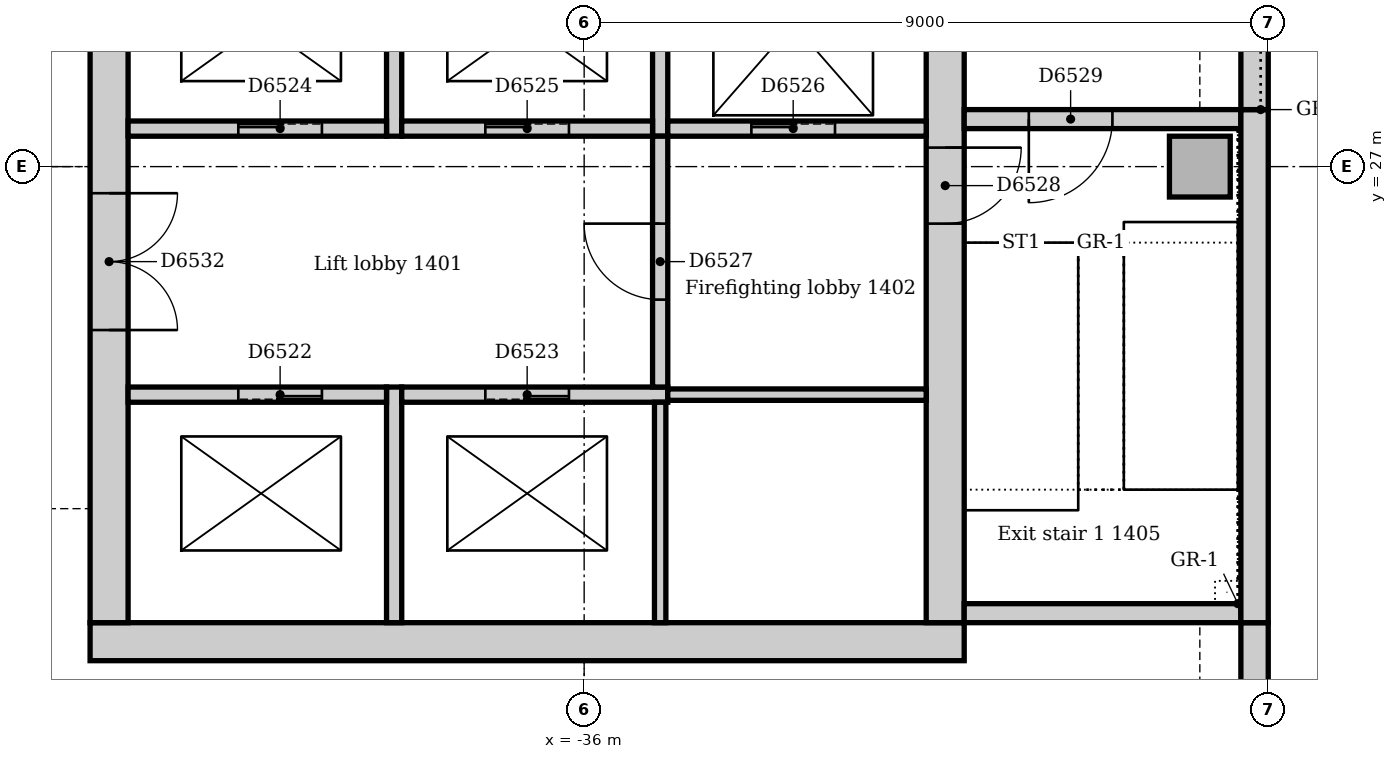
"""IFC4 building model, lengths in metres.
Left out: names, types, materials, properties, quantities, classifications, styles, units other than length and angle.
Written with IfcOpenShell. Run it as: python <this file> out.ifc"""

import sys

from ifc_helpers import new_model, si_unit, direction, frame, frame_2d, origin, origin_2d, place, context, subcontext, project, spatial, rectangle, extrude, element, fill, save


model = new_model("IFC4")
c1 = context("Model", 3, precision=1e-05, world=origin(), true_north=direction((0.0, 1.0)))
c2 = subcontext(c1, "Body", "Model", "MODEL_VIEW")
j1 = project(units=[si_unit("LENGTHUNIT", "METRE"), si_unit("PLANEANGLEUNIT", "RADIAN")], contexts=[c1])
p1 = place(None, origin())
s1 = spatial("IfcSite", under=j1, at=p1, CompositionType="ELEMENT")
p2 = place(p1, origin())
s2 = spatial("IfcBuilding", under=s1, at=p2, CompositionType="ELEMENT")
p3 = place(p2, frame((0.0, 0.0, 63.0)))
s3 = spatial("IfcBuildingStorey", under=s2, at=p3, CompositionType="ELEMENT", Elevation=63.0)
p4 = place(p3, frame((-42.5, 20.75, 0.0), z_axis=(0.0, 0.0, 1.0), x_axis=(1.0, 0.0, 0.0)))
e1 = element("IfcWall", 1, at=p4, inside=s3, PredefinedType="SOLIDWALL", context=c2, shape_type="SweptSolid", body=[
    extrude(rectangle(XDim=11.5, YDim=0.5, at=frame_2d((5.75, 0.0))), origin(), (0.0, 0.0, 1.0), 4.0),
])
p5 = place(p3, frame((-31.25, 21.0, 0.0), z_axis=(0.0, 0.0, 1.0), x_axis=(0.0, 1.0, 0.0)))
e2 = element("IfcWall", 2, at=p5, inside=s3, PredefinedType="SOLIDWALL", context=c2, shape_type="SweptSolid", body=[
    extrude(rectangle(XDim=9.5, YDim=0.5, at=frame_2d((4.75, 0.0))), origin(), (0.0, 0.0, 1.0), 4.0),
])
p6 = place(p5, frame((5.25, 0.0, 0.0)))
e3 = element("IfcOpeningElement", 3, at=p6, cuts=e2, PredefinedType="OPENING", context=c2, shape_type="SweptSolid", body=[
    extrude(rectangle(XDim=1.0, YDim=2.1, at=frame_2d((0.5, 1.05))), frame((0.0, 0.26, 0.0), z_axis=(0.0, -1.0, 0.0), x_axis=(1.0, 0.0, 0.0)), (0.0, 0.0, 1.0), 0.52),
])
p7 = place(p3, frame((-42.25, 30.5, 0.0), z_axis=(0.0, 0.0, 1.0), x_axis=(0.0, -1.0, 0.0)))
e4 = element("IfcWall", 4, at=p7, inside=s3, PredefinedType="SOLIDWALL", context=c2, shape_type="SweptSolid", body=[
    extrude(rectangle(XDim=9.5, YDim=0.5, at=frame_2d((4.75, 0.0))), origin(), (0.0, 0.0, 1.0), 4.0),
])
p8 = place(p7, frame((3.85, 0.0, 0.0)))
e5 = element("IfcOpeningElement", 5, at=p8, cuts=e4, PredefinedType="OPENING", context=c2, shape_type="SweptSolid", body=[
    extrude(rectangle(XDim=1.8, YDim=2.1, at=frame_2d((0.9, 1.05))), frame((0.0, 0.26, 0.0), z_axis=(0.0, -1.0, 0.0), x_axis=(1.0, 0.0, 0.0)), (0.0, 0.0, 1.0), 0.52),
])
p9 = place(p3, frame((-31.0, 21.125, 0.0), z_axis=(0.0, 0.0, 1.0), x_axis=(1.0, 0.0, 0.0)))
e6 = element("IfcWall", 6, at=p9, inside=s3, PredefinedType="SOLIDWALL", context=c2, shape_type="SweptSolid", body=[
    extrude(rectangle(XDim=3.64, YDim=0.25, at=frame_2d((1.82, 0.0))), origin(), (0.0, 0.0, 1.0), 4.0),
])
p10 = place(p3, frame((-27.36, 27.625, 0.0), z_axis=(0.0, 0.0, 1.0), x_axis=(-1.0, 0.0, 0.0)))
e7 = element("IfcWall", 7, at=p10, inside=s3, PredefinedType="SOLIDWALL", context=c2, shape_type="SweptSolid", body=[
    extrude(rectangle(XDim=3.64, YDim=0.25, at=frame_2d((1.82, 0.0))), origin(), (0.0, 0.0, 1.0), 4.0),
])
p11 = place(p10, frame((1.69, 0.0, 0.0)))
e8 = element("IfcOpeningElement", 8, at=p11, cuts=e7, PredefinedType="OPENING", context=c2, shape_type="SweptSolid", body=[
    extrude(rectangle(XDim=1.1, YDim=2.1, at=frame_2d((0.55, 1.05))), frame((0.0, 0.135, 0.0), z_axis=(0.0, -1.0, 0.0), x_axis=(1.0, 0.0, 0.0)), (0.0, 0.0, 1.0), 0.27),
])
p12 = place(p3, frame((-27.9, 27.0, 0.0), z_axis=(0.0, 0.0, 1.0), x_axis=(1.0, 0.0, 0.0)))
e9 = element("IfcColumn", 9, at=p12, inside=s3, PredefinedType="COLUMN", context=c2, shape_type="SweptSolid", body=[
    extrude(rectangle(XDim=0.8, YDim=0.8, at=origin_2d()), origin(), (0.0, 0.0, 1.0), 4.0),
])
p13 = place(p3, frame((-27.18, 13.243, 0.0), z_axis=(0.0, 0.0, 1.0), x_axis=(0.0, 1.0, 0.0)))
e10 = element("IfcWall", 10, at=p13, inside=s3, PredefinedType="STANDARD", context=c2, shape_type="SweptSolid", body=[
    extrude(rectangle(XDim=7.757, YDim=0.36, at=frame_2d((3.879, 0.0))), origin(), (0.0, 0.0, 1.0), 3.85),
])
p14 = place(p13, frame((1.982, 0.0, 0.9)))
e11 = element("IfcOpeningElement", 11, at=p14, cuts=e10, PredefinedType="OPENING", context=c2, shape_type="SweptSolid", body=[
    extrude(rectangle(XDim=3.3, YDim=1.6, at=frame_2d((1.65, 0.8))), frame((0.0, 0.19, 0.0), z_axis=(0.0, -1.0, 0.0), x_axis=(1.0, 0.0, 0.0)), (0.0, 0.0, 1.0), 0.38),
])
p15 = place(p3, frame((-27.18, 21.0, 0.0), z_axis=(0.0, 0.0, 1.0), x_axis=(0.0, 1.0, 0.0)))
e12 = element("IfcWall", 12, at=p15, inside=s3, PredefinedType="STANDARD", context=c2, shape_type="SweptSolid", body=[
    extrude(rectangle(XDim=6.75, YDim=0.36, at=frame_2d((3.375, 0.0))), origin(), (0.0, 0.0, 1.0), 3.85),
])
p16 = place(p3, frame((-27.18, 27.75, 0.0), z_axis=(0.0, 0.0, 1.0), x_axis=(0.0, 1.0, 0.0)))
e13 = element("IfcWall", 13, at=p16, inside=s3, PredefinedType="STANDARD", context=c2, shape_type="SweptSolid", body=[
    extrude(rectangle(XDim=7.5, YDim=0.36, at=frame_2d((3.75, 0.0))), origin(), (0.0, 0.0, 1.0), 3.85),
])
p17 = place(p16, frame((2.85, 0.0, 1.2)))
e14 = element("IfcOpeningElement", 14, at=p17, cuts=e13, PredefinedType="OPENING", context=c2, shape_type="SweptSolid", body=[
    extrude(rectangle(XDim=1.8, YDim=1.2, at=frame_2d((0.9, 0.6))), frame((0.0, 0.19, 0.0), z_axis=(0.0, -1.0, 0.0), x_axis=(1.0, 0.0, 0.0)), (0.0, 0.0, 1.0), 0.38),
])
p18 = place(p3, frame((-38.5, 21.0, 0.0), z_axis=(0.0, 0.0, 1.0), x_axis=(0.0, 1.0, 0.0)))
e15 = element("IfcWall", 15, at=p18, inside=s3, PredefinedType="SOLIDWALL", context=c2, shape_type="SweptSolid", body=[
    extrude(rectangle(XDim=3.1, YDim=0.2, at=frame_2d((1.55, 0.0))), origin(), (0.0, 0.0, 1.0), 4.0),
])
p19 = place(p3, frame((-38.6, 24.0, 0.0), z_axis=(0.0, 0.0, 1.0), x_axis=(-1.0, 0.0, 0.0)))
e16 = element("IfcWall", 16, at=p19, inside=s3, PredefinedType="SOLIDWALL", context=c2, shape_type="SweptSolid", body=[
    extrude(rectangle(XDim=3.4, YDim=0.2, at=frame_2d((1.7, 0.0))), origin(), (0.0, 0.0, 1.0), 4.0),
])
p20 = place(p19, frame((0.85, 0.0, 0.0)))
e17 = element("IfcOpeningElement", 17, at=p20, cuts=e16, PredefinedType="OPENING", context=c2, shape_type="SweptSolid", body=[
    extrude(rectangle(XDim=1.1, YDim=2.1, at=frame_2d((0.55, 1.05))), frame((0.0, 0.11, 0.0), z_axis=(0.0, -1.0, 0.0), x_axis=(1.0, 0.0, 0.0)), (0.0, 0.0, 1.0), 0.22),
])
p21 = place(p3, frame((-34.9, 24.0, 0.0), z_axis=(0.0, 0.0, 1.0), x_axis=(-1.0, 0.0, 0.0)))
e18 = element("IfcWall", 18, at=p21, inside=s3, PredefinedType="SOLIDWALL", context=c2, shape_type="SweptSolid", body=[
    extrude(rectangle(XDim=3.5, YDim=0.2, at=frame_2d((1.75, 0.0))), origin(), (0.0, 0.0, 1.0), 4.0),
])
p22 = place(p21, frame((1.3, 0.0, 0.0)))
e19 = element("IfcOpeningElement", 19, at=p22, cuts=e18, PredefinedType="OPENING", context=c2, shape_type="SweptSolid", body=[
    extrude(rectangle(XDim=1.1, YDim=2.1, at=frame_2d((0.55, 1.05))), frame((0.0, 0.11, 0.0), z_axis=(0.0, -1.0, 0.0), x_axis=(1.0, 0.0, 0.0)), (0.0, 0.0, 1.0), 0.22),
])
p23 = place(p3, frame((-38.5, 27.4, 0.0), z_axis=(0.0, 0.0, 1.0), x_axis=(0.0, 1.0, 0.0)))
e20 = element("IfcWall", 20, at=p23, inside=s3, PredefinedType="SOLIDWALL", context=c2, shape_type="SweptSolid", body=[
    extrude(rectangle(XDim=2.85, YDim=0.2, at=frame_2d((1.425, 0.0))), origin(), (0.0, 0.0, 1.0), 4.0),
])
p24 = place(p3, frame((-42.0, 27.5, 0.0), z_axis=(0.0, 0.0, 1.0), x_axis=(1.0, 0.0, 0.0)))
e21 = element("IfcWall", 21, at=p24, inside=s3, PredefinedType="SOLIDWALL", context=c2, shape_type="SweptSolid", body=[
    extrude(rectangle(XDim=3.4, YDim=0.2, at=frame_2d((1.7, 0.0))), origin(), (0.0, 0.0, 1.0), 4.0),
])
p25 = place(p24, frame((1.45, 0.0, 0.0)))
e22 = element("IfcOpeningElement", 22, at=p25, cuts=e21, PredefinedType="OPENING", context=c2, shape_type="SweptSolid", body=[
    extrude(rectangle(XDim=1.1, YDim=2.1, at=frame_2d((0.55, 1.05))), frame((0.0, 0.11, 0.0), z_axis=(0.0, -1.0, 0.0), x_axis=(1.0, 0.0, 0.0)), (0.0, 0.0, 1.0), 0.22),
])
p26 = place(p3, frame((-35.0, 27.4, 0.0), z_axis=(0.0, 0.0, 1.0), x_axis=(0.0, 1.0, 0.0)))
e23 = element("IfcWall", 23, at=p26, inside=s3, PredefinedType="SOLIDWALL", context=c2, shape_type="SweptSolid", body=[
    extrude(rectangle(XDim=2.85, YDim=0.2, at=frame_2d((1.425, 0.0))), origin(), (0.0, 0.0, 1.0), 4.0),
])
p27 = place(p3, frame((-38.4, 27.5, 0.0), z_axis=(0.0, 0.0, 1.0), x_axis=(1.0, 0.0, 0.0)))
e24 = element("IfcWall", 24, at=p27, inside=s3, PredefinedType="SOLIDWALL", context=c2, shape_type="SweptSolid", body=[
    extrude(rectangle(XDim=3.3, YDim=0.2, at=frame_2d((1.65, 0.0))), origin(), (0.0, 0.0, 1.0), 4.0),
])
p28 = place(p27, frame((1.1, 0.0, 0.0)))
e25 = element("IfcOpeningElement", 25, at=p28, cuts=e24, PredefinedType="OPENING", context=c2, shape_type="SweptSolid", body=[
    extrude(rectangle(XDim=1.1, YDim=2.1, at=frame_2d((0.55, 1.05))), frame((0.0, 0.11, 0.0), z_axis=(0.0, -1.0, 0.0), x_axis=(1.0, 0.0, 0.0)), (0.0, 0.0, 1.0), 0.22),
])
p29 = place(p3, frame((-34.9, 27.5, 0.0), z_axis=(0.0, 0.0, 1.0), x_axis=(1.0, 0.0, 0.0)))
e26 = element("IfcWall", 26, at=p29, inside=s3, PredefinedType="SOLIDWALL", context=c2, shape_type="SweptSolid", body=[
    extrude(rectangle(XDim=3.4, YDim=0.2, at=frame_2d((1.7, 0.0))), origin(), (0.0, 0.0, 1.0), 4.0),
])
p30 = place(p29, frame((1.1, 0.0, 0.0)))
e27 = element("IfcOpeningElement", 27, at=p30, cuts=e26, PredefinedType="OPENING", context=c2, shape_type="SweptSolid", body=[
    extrude(rectangle(XDim=1.1, YDim=2.1, at=frame_2d((0.55, 1.05))), frame((0.0, 0.11, 0.0), z_axis=(0.0, -1.0, 0.0), x_axis=(1.0, 0.0, 0.0)), (0.0, 0.0, 1.0), 0.22),
])
p31 = place(p3, frame((-35.0, 24.1, 0.0), z_axis=(0.0, 0.0, 1.0), x_axis=(0.0, 1.0, 0.0)))
e28 = element("IfcWall", 28, at=p31, inside=s3, PredefinedType="SOLIDWALL", context=c2, shape_type="SweptSolid", body=[
    extrude(rectangle(XDim=3.3, YDim=0.2, at=frame_2d((1.65, 0.0))), origin(), (0.0, 0.0, 1.0), 4.0),
])
p32 = place(p31, frame((1.15, 0.0, 0.0)))
e29 = element("IfcOpeningElement", 29, at=p32, cuts=e28, PredefinedType="OPENING", context=c2, shape_type="SweptSolid", body=[
    extrude(rectangle(XDim=1.0, YDim=2.1, at=frame_2d((0.5, 1.05))), frame((0.0, 0.11, 0.0), z_axis=(0.0, -1.0, 0.0), x_axis=(1.0, 0.0, 0.0)), (0.0, 0.0, 1.0), 0.22),
])
p33 = place(p3, frame((-35.0, 21.0, 0.0), z_axis=(0.0, 0.0, 1.0), x_axis=(0.0, 1.0, 0.0)))
e30 = element("IfcWall", 30, at=p33, inside=s3, PredefinedType="SOLIDWALL", context=c2, shape_type="SweptSolid", body=[
    extrude(rectangle(XDim=2.9, YDim=0.15, at=frame_2d((1.45, 0.0))), origin(), (0.0, 0.0, 1.0), 4.0),
])
p34 = place(p3, frame((-31.5, 24.0, 0.0), z_axis=(0.0, 0.0, 1.0), x_axis=(-1.0, 0.0, 0.0)))
e31 = element("IfcWall", 31, at=p34, inside=s3, PredefinedType="SOLIDWALL", context=c2, shape_type="SweptSolid", body=[
    extrude(rectangle(XDim=3.4, YDim=0.15, at=frame_2d((1.7, 0.0))), origin(), (0.0, 0.0, 1.0), 4.0),
])
p35 = place(p20, origin())
e32 = element("IfcDoor", 32, at=p35, inside=s3, OperationType="SLIDING_TO_LEFT", PredefinedType="DOOR", context=c2, shape_type="SweptSolid", body=[
    extrude(rectangle(XDim=1.1, YDim=2.1, at=frame_2d((0.55, 1.05))), frame((0.0, 0.025, 0.0), z_axis=(0.0, -1.0, 0.0), x_axis=(1.0, 0.0, 0.0)), (0.0, 0.0, 1.0), 0.05),
])
fill(e17, e32)
p36 = place(p22, origin())
e33 = element("IfcDoor", 33, at=p36, inside=s3, OperationType="SLIDING_TO_LEFT", PredefinedType="DOOR", context=c2, shape_type="SweptSolid", body=[
    extrude(rectangle(XDim=1.1, YDim=2.1, at=frame_2d((0.55, 1.05))), frame((0.0, 0.025, 0.0), z_axis=(0.0, -1.0, 0.0), x_axis=(1.0, 0.0, 0.0)), (0.0, 0.0, 1.0), 0.05),
])
fill(e19, e33)
p37 = place(p25, origin())
e34 = element("IfcDoor", 34, at=p37, inside=s3, OperationType="SLIDING_TO_LEFT", PredefinedType="DOOR", context=c2, shape_type="SweptSolid", body=[
    extrude(rectangle(XDim=1.1, YDim=2.1, at=frame_2d((0.55, 1.05))), frame((0.0, 0.025, 0.0), z_axis=(0.0, -1.0, 0.0), x_axis=(1.0, 0.0, 0.0)), (0.0, 0.0, 1.0), 0.05),
])
fill(e22, e34)
p38 = place(p28, origin())
e35 = element("IfcDoor", 35, at=p38, inside=s3, OperationType="SLIDING_TO_LEFT", PredefinedType="DOOR", context=c2, shape_type="SweptSolid", body=[
    extrude(rectangle(XDim=1.1, YDim=2.1, at=frame_2d((0.55, 1.05))), frame((0.0, 0.025, 0.0), z_axis=(0.0, -1.0, 0.0), x_axis=(1.0, 0.0, 0.0)), (0.0, 0.0, 1.0), 0.05),
])
fill(e25, e35)
p39 = place(p30, origin())
e36 = element("IfcDoor", 36, at=p39, inside=s3, OperationType="SLIDING_TO_LEFT", PredefinedType="DOOR", context=c2, shape_type="SweptSolid", body=[
    extrude(rectangle(XDim=1.1, YDim=2.1, at=frame_2d((0.55, 1.05))), frame((0.0, 0.025, 0.0), z_axis=(0.0, -1.0, 0.0), x_axis=(1.0, 0.0, 0.0)), (0.0, 0.0, 1.0), 0.05),
])
fill(e27, e36)
p40 = place(p32, origin())
e37 = element("IfcDoor", 37, at=p40, inside=s3, OperationType="SINGLE_SWING_RIGHT", PredefinedType="DOOR", context=c2, shape_type="SweptSolid", body=[
    extrude(rectangle(XDim=1.0, YDim=2.1, at=frame_2d((0.5, 1.05))), frame((0.0, 0.025, 0.0), z_axis=(0.0, -1.0, 0.0), x_axis=(1.0, 0.0, 0.0)), (0.0, 0.0, 1.0), 0.05),
])
fill(e29, e37)
p41 = place(p6, frame((1.0, 0.0, 0.0), z_axis=(0.0, 0.0, 1.0), x_axis=(-1.0, 0.0, 0.0)))
e38 = element("IfcDoor", 38, at=p41, inside=s3, OperationType="SINGLE_SWING_LEFT", PredefinedType="DOOR", context=c2, shape_type="SweptSolid", body=[
    extrude(rectangle(XDim=1.0, YDim=2.1, at=frame_2d((0.5, 1.05))), frame((0.0, 0.025, 0.0), z_axis=(0.0, -1.0, 0.0), x_axis=(1.0, 0.0, 0.0)), (0.0, 0.0, 1.0), 0.05),
])
fill(e3, e38)
p42 = place(p11, origin())
e39 = element("IfcDoor", 39, at=p42, inside=s3, OperationType="SINGLE_SWING_RIGHT", PredefinedType="DOOR", context=c2, shape_type="SweptSolid", body=[
    extrude(rectangle(XDim=1.1, YDim=2.1, at=frame_2d((0.55, 1.05))), frame((0.0, 0.025, 0.0), z_axis=(0.0, -1.0, 0.0), x_axis=(1.0, 0.0, 0.0)), (0.0, 0.0, 1.0), 0.05),
])
fill(e8, e39)
p43 = place(p8, origin())
e40 = element("IfcDoor", 40, at=p43, inside=s3, OperationType="DOUBLE_DOOR_SINGLE_SWING", PredefinedType="DOOR", context=c2, shape_type="SweptSolid", body=[
    extrude(rectangle(XDim=1.8, YDim=2.1, at=frame_2d((0.9, 1.05))), frame((0.0, 0.025, 0.0), z_axis=(0.0, -1.0, 0.0), x_axis=(1.0, 0.0, 0.0)), (0.0, 0.0, 1.0), 0.05),
])
fill(e5, e40)
save(model, sys.argv[1])
